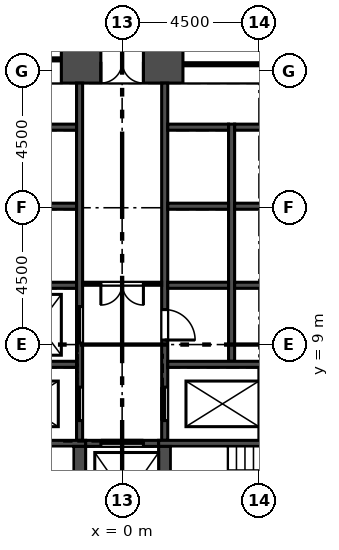
"""IFC4 building model, lengths in metres.
Left out: names, types, materials, properties, quantities, classifications, styles, units other than length and angle.
Written with IfcOpenShell. Run it as: python <this file> out.ifc"""

import sys

from ifc_helpers import new_model, si_unit, direction, frame, frame_2d, origin, place, context, subcontext, project, spatial, rectangle, extrude, element, fill, save


model = new_model("IFC4")
c1 = context("Model", 3, precision=1e-05, world=origin(), true_north=direction((0.0, 1.0)))
c2 = subcontext(c1, "Body", "Model", "MODEL_VIEW")
j1 = project(units=[si_unit("LENGTHUNIT", "METRE"), si_unit("PLANEANGLEUNIT", "RADIAN")], contexts=[c1])
p1 = place(None, origin())
s1 = spatial("IfcSite", under=j1, at=p1, CompositionType="ELEMENT")
p2 = place(p1, origin())
s2 = spatial("IfcBuilding", under=s1, at=p2, CompositionType="ELEMENT")
p3 = place(p2, frame((0.0, 0.0, 20.0)))
s3 = spatial("IfcBuildingStorey", under=s2, at=p3, CompositionType="ELEMENT", Elevation=20.0)
p4 = place(p3, frame((9.412, 18.3, 0.0), z_axis=(0.0, 0.0, 1.0), x_axis=(-1.0, 0.0, 0.0)))
e1 = element("IfcWall", 1, at=p4, inside=s3, PredefinedType="SHEAR", context=c2, shape_type="SweptSolid", body=[
    extrude(rectangle(XDim=18.823, YDim=1.4, at=frame_2d((9.412, 0.0))), origin(), (0.0, 0.0, 1.0), 5.0),
])
p5 = place(p4, frame((8.711, 0.0, 0.0)))
e2 = element("IfcOpeningElement", 2, at=p5, cuts=e1, PredefinedType="OPENING", context=c2, shape_type="SweptSolid", body=[
    extrude(rectangle(XDim=1.4, YDim=2.1, at=frame_2d((0.7, 1.05))), frame((0.0, 0.71, 0.0), z_axis=(0.0, -1.0, 0.0), x_axis=(1.0, 0.0, 0.0)), (0.0, 0.0, 1.0), 1.42),
])
p6 = place(p4, frame((11.412, 0.0, 0.0)))
e3 = element("IfcOpeningElement", 3, at=p6, cuts=e1, PredefinedType="OPENING", context=c2, shape_type="SweptSolid", body=[
    extrude(rectangle(XDim=6.0, YDim=2.4, at=frame_2d((3.0, 1.2))), frame((0.0, 0.71, 0.0), z_axis=(0.0, -1.0, 0.0), x_axis=(1.0, 0.0, 0.0)), (0.0, 0.0, 1.0), 1.42),
])
p7 = place(p4, frame((1.412, 0.0, 0.0)))
e4 = element("IfcOpeningElement", 4, at=p7, cuts=e1, PredefinedType="OPENING", context=c2, shape_type="SweptSolid", body=[
    extrude(rectangle(XDim=6.0, YDim=2.4, at=frame_2d((3.0, 1.2))), frame((0.0, 0.71, 0.0), z_axis=(0.0, -1.0, 0.0), x_axis=(1.0, 0.0, 0.0)), (0.0, 0.0, 1.0), 1.42),
])
p8 = place(p3, frame((3.6, 8.45, -0.3), z_axis=(0.0, 0.0, 1.0), x_axis=(0.0, 1.0, 0.0)))
e5 = element("IfcWall", 5, at=p8, inside=s3, PredefinedType="SOLIDWALL", context=c2, shape_type="SweptSolid", body=[
    extrude(rectangle(XDim=7.8, YDim=0.2, at=frame_2d((3.9, 0.0))), origin(), (0.0, 0.0, 1.0), 3.3),
])
p9 = place(p3, frame((-1.4, 5.85, -0.3), z_axis=(0.0, 0.0, 1.0), x_axis=(0.0, 1.0, 0.0)))
e6 = element("IfcWall", 6, at=p9, inside=s3, PredefinedType="SOLIDWALL", context=c2, shape_type="SweptSolid", body=[
    extrude(rectangle(XDim=11.75, YDim=0.2, at=frame_2d((5.875, 0.0))), origin(), (0.0, 0.0, 1.0), 3.3),
])
p10 = place(p9, frame((3.2, 0.0, 0.3)))
e7 = element("IfcOpeningElement", 7, at=p10, cuts=e6, PredefinedType="OPENING", context=c2, shape_type="SweptSolid", body=[
    extrude(rectangle(XDim=1.2, YDim=2.1, at=frame_2d((0.6, 1.05))), frame((0.0, 0.11, 0.0), z_axis=(0.0, -1.0, 0.0), x_axis=(1.0, 0.0, 0.0)), (0.0, 0.0, 1.0), 0.22),
])
p11 = place(p9, frame((0.65, 0.0, 0.3)))
e8 = element("IfcOpeningElement", 8, at=p11, cuts=e6, PredefinedType="OPENING", context=c2, shape_type="SweptSolid", body=[
    extrude(rectangle(XDim=1.1, YDim=2.1, at=frame_2d((0.55, 1.05))), frame((0.0, 0.11, 0.0), z_axis=(0.0, -1.0, 0.0), x_axis=(1.0, 0.0, 0.0)), (0.0, 0.0, 1.0), 0.22),
])
p12 = place(p3, frame((1.4, 5.85, -0.3), z_axis=(0.0, 0.0, 1.0), x_axis=(0.0, 1.0, 0.0)))
e9 = element("IfcWall", 9, at=p12, inside=s3, PredefinedType="SOLIDWALL", context=c2, shape_type="SweptSolid", body=[
    extrude(rectangle(XDim=11.75, YDim=0.2, at=frame_2d((5.875, 0.0))), origin(), (0.0, 0.0, 1.0), 3.3),
])
p13 = place(p12, frame((0.65, 0.0, 0.3)))
e10 = element("IfcOpeningElement", 10, at=p13, cuts=e9, PredefinedType="OPENING", context=c2, shape_type="SweptSolid", body=[
    extrude(rectangle(XDim=1.1, YDim=2.1, at=frame_2d((0.55, 1.05))), frame((0.0, 0.11, 0.0), z_axis=(0.0, -1.0, 0.0), x_axis=(1.0, 0.0, 0.0)), (0.0, 0.0, 1.0), 0.22),
])
p14 = place(p12, frame((3.3, 0.0, 0.3)))
e11 = element("IfcOpeningElement", 11, at=p14, cuts=e9, PredefinedType="OPENING", context=c2, shape_type="SweptSolid", body=[
    extrude(rectangle(XDim=1.0, YDim=2.1, at=frame_2d((0.5, 1.05))), frame((0.0, 0.11, 0.0), z_axis=(0.0, -1.0, 0.0), x_axis=(1.0, 0.0, 0.0)), (0.0, 0.0, 1.0), 0.22),
])
for number, where, z_axis, x_axis in (
    (12, (-5.7, 8.35, -0.3), (0.0, 0.0, 1.0), (1.0, 0.0, 0.0)),
    (13, (1.5, 8.35, -0.3), (0.0, 0.0, 1.0), (1.0, 0.0, 0.0)),
):
    element("IfcWall", number, at=place(p3, frame(where, z_axis=z_axis, x_axis=x_axis)), inside=s3, PredefinedType="SOLIDWALL", context=c2, shape_type="SweptSolid", body=[
        extrude(rectangle(XDim=4.2, YDim=0.2, at=frame_2d((2.1, 0.0))), origin(), (0.0, 0.0, 1.0), 3.3),
    ])
p15 = place(p3, frame((-12.6, 5.75, -0.3), z_axis=(0.0, 0.0, 1.0), x_axis=(1.0, 0.0, 0.0)))
e14 = element("IfcWall", 14, at=p15, inside=s3, PredefinedType="SOLIDWALL", context=c2, shape_type="SweptSolid", body=[
    extrude(rectangle(XDim=11.4, YDim=0.2, at=frame_2d((5.7, 0.0))), origin(), (0.0, 0.0, 1.0), 3.3),
])
p16 = place(p3, frame((-1.2, 5.75, -0.3), z_axis=(0.0, 0.0, 1.0), x_axis=(1.0, 0.0, 0.0)))
e15 = element("IfcWall", 15, at=p16, inside=s3, PredefinedType="SOLIDWALL", context=c2, shape_type="SweptSolid", body=[
    extrude(rectangle(XDim=2.4, YDim=0.2, at=frame_2d((1.2, 0.0))), origin(), (0.0, 0.0, 1.0), 3.3),
])
p17 = place(p16, frame((0.5, 0.0, 0.3)))
e16 = element("IfcOpeningElement", 16, at=p17, cuts=e15, PredefinedType="OPENING", context=c2, shape_type="SweptSolid", body=[
    extrude(rectangle(XDim=1.4, YDim=2.1, at=frame_2d((0.7, 1.05))), frame((0.0, 0.11, 0.0), z_axis=(0.0, -1.0, 0.0), x_axis=(1.0, 0.0, 0.0)), (0.0, 0.0, 1.0), 0.22),
])
p18 = place(p3, frame((1.2, 5.75, -0.3), z_axis=(0.0, 0.0, 1.0), x_axis=(1.0, 0.0, 0.0)))
e17 = element("IfcWall", 17, at=p18, inside=s3, PredefinedType="SOLIDWALL", context=c2, shape_type="SweptSolid", body=[
    extrude(rectangle(XDim=11.4, YDim=0.2, at=frame_2d((5.7, 0.0))), origin(), (0.0, 0.0, 1.0), 3.3),
])
for number, where, z_axis, x_axis in (
    (18, (-1.4, 2.25, -0.3), (0.0, 0.0, 1.0), (0.0, 1.0, 0.0)),
    (19, (1.4, 2.25, -0.3), (0.0, 0.0, 1.0), (0.0, 1.0, 0.0)),
):
    element("IfcWall", number, at=place(p3, frame(where, z_axis=z_axis, x_axis=x_axis)), inside=s3, PredefinedType="SOLIDWALL", context=c2, shape_type="SweptSolid", body=[
        extrude(rectangle(XDim=3.4, YDim=0.4, at=frame_2d((1.7, 0.0))), origin(), (0.0, 0.0, 1.0), 3.3),
    ])
for number, where, z_axis, x_axis in (
    (20, (-3.5, 10.95, -0.3), (0.0, 0.0, 1.0), (1.0, 0.0, 0.0)),
    (21, (-3.5, 13.55, -0.3), (0.0, 0.0, 1.0), (1.0, 0.0, 0.0)),
    (22, (-3.5, 16.15, -0.3), (0.0, 0.0, 1.0), (1.0, 0.0, 0.0)),
    (23, (3.7, 10.95, -0.3), (0.0, 0.0, 1.0), (1.0, 0.0, 0.0)),
    (24, (3.7, 13.55, -0.3), (0.0, 0.0, 1.0), (1.0, 0.0, 0.0)),
    (25, (3.7, 16.15, -0.3), (0.0, 0.0, 1.0), (1.0, 0.0, 0.0)),
    (26, (1.5, 10.95, -0.3), (0.0, 0.0, 1.0), (1.0, 0.0, 0.0)),
    (27, (1.5, 13.55, -0.3), (0.0, 0.0, 1.0), (1.0, 0.0, 0.0)),
    (28, (1.5, 16.15, -0.3), (0.0, 0.0, 1.0), (1.0, 0.0, 0.0)),
):
    element("IfcWall", number, at=place(p3, frame(where, z_axis=z_axis, x_axis=x_axis)), inside=s3, PredefinedType="SOLIDWALL", context=c2, shape_type="SweptSolid", body=[
        extrude(rectangle(XDim=2.0, YDim=0.2, at=frame_2d((1.0, 0.0))), origin(), (0.0, 0.0, 1.0), 3.3),
    ])
p19 = place(p3, frame((-1.3, 11.0, 0.0), z_axis=(0.0, 0.0, 1.0), x_axis=(1.0, 0.0, 0.0)))
e29 = element("IfcWall", 29, at=p19, inside=s3, PredefinedType="PARTITIONING", context=c2, shape_type="SweptSolid", body=[
    extrude(rectangle(XDim=2.6, YDim=0.1, at=frame_2d((1.3, 0.0))), origin(), (0.0, 0.0, 1.0), 3.0),
])
p20 = place(p19, frame((0.6, 0.0, 0.0)))
e30 = element("IfcOpeningElement", 30, at=p20, cuts=e29, PredefinedType="OPENING", context=c2, shape_type="SweptSolid", body=[
    extrude(rectangle(XDim=1.4, YDim=2.1, at=frame_2d((0.7, 1.05))), frame((0.0, 0.06, 0.0), z_axis=(0.0, -1.0, 0.0), x_axis=(1.0, 0.0, 0.0)), (0.0, 0.0, 1.0), 0.12),
])
p21 = place(p10, origin())
e31 = element("IfcDoor", 31, at=p21, inside=s3, OperationType="SLIDING_TO_LEFT", PredefinedType="DOOR", context=c2, shape_type="SweptSolid", body=[
    extrude(rectangle(XDim=1.2, YDim=2.1, at=frame_2d((0.6, 1.05))), frame((0.0, 0.025, 0.0), z_axis=(0.0, -1.0, 0.0), x_axis=(1.0, 0.0, 0.0)), (0.0, 0.0, 1.0), 0.05),
])
fill(e7, e31)
p22 = place(p11, origin())
e32 = element("IfcDoor", 32, at=p22, inside=s3, OperationType="SLIDING_TO_RIGHT", PredefinedType="DOOR", context=c2, shape_type="SweptSolid", body=[
    extrude(rectangle(XDim=1.1, YDim=2.1, at=frame_2d((0.55, 1.05))), frame((0.0, 0.025, 0.0), z_axis=(0.0, -1.0, 0.0), x_axis=(1.0, 0.0, 0.0)), (0.0, 0.0, 1.0), 0.05),
])
fill(e8, e32)
p23 = place(p13, origin())
e33 = element("IfcDoor", 33, at=p23, inside=s3, OperationType="SLIDING_TO_RIGHT", PredefinedType="DOOR", context=c2, shape_type="SweptSolid", body=[
    extrude(rectangle(XDim=1.1, YDim=2.1, at=frame_2d((0.55, 1.05))), frame((0.0, 0.025, 0.0), z_axis=(0.0, -1.0, 0.0), x_axis=(1.0, 0.0, 0.0)), (0.0, 0.0, 1.0), 0.05),
])
fill(e10, e33)
p24 = place(p17, origin())
e34 = element("IfcDoor", 34, at=p24, inside=s3, OperationType="SLIDING_TO_LEFT", PredefinedType="DOOR", context=c2, shape_type="SweptSolid", body=[
    extrude(rectangle(XDim=1.4, YDim=2.1, at=frame_2d((0.7, 1.05))), frame((0.0, 0.025, 0.0), z_axis=(0.0, -1.0, 0.0), x_axis=(1.0, 0.0, 0.0)), (0.0, 0.0, 1.0), 0.05),
])
fill(e16, e34)
p25 = place(p14, frame((1.0, 0.0, 0.0), z_axis=(0.0, 0.0, 1.0), x_axis=(-1.0, 0.0, 0.0)))
e35 = element("IfcDoor", 35, at=p25, inside=s3, OperationType="SINGLE_SWING_RIGHT", PredefinedType="DOOR", context=c2, shape_type="SweptSolid", body=[
    extrude(rectangle(XDim=1.0, YDim=2.1, at=frame_2d((0.5, 1.05))), frame((0.0, 0.025, 0.0), z_axis=(0.0, -1.0, 0.0), x_axis=(1.0, 0.0, 0.0)), (0.0, 0.0, 1.0), 0.05),
])
fill(e11, e35)
p26 = place(p20, frame((1.4, 0.0, 0.0), z_axis=(0.0, 0.0, 1.0), x_axis=(-1.0, 0.0, 0.0)))
e36 = element("IfcDoor", 36, at=p26, inside=s3, OperationType="DOUBLE_DOOR_SINGLE_SWING", PredefinedType="DOOR", context=c2, shape_type="SweptSolid", body=[
    extrude(rectangle(XDim=1.4, YDim=2.1, at=frame_2d((0.7, 1.05))), frame((0.0, 0.025, 0.0), z_axis=(0.0, -1.0, 0.0), x_axis=(1.0, 0.0, 0.0)), (0.0, 0.0, 1.0), 0.05),
])
fill(e30, e36)
p27 = place(p5, origin())
e37 = element("IfcDoor", 37, at=p27, inside=s3, OperationType="DOUBLE_DOOR_SINGLE_SWING", PredefinedType="DOOR", context=c2, shape_type="SweptSolid", body=[
    extrude(rectangle(XDim=1.4, YDim=2.1, at=frame_2d((0.7, 1.05))), frame((0.0, 0.025, 0.0), z_axis=(0.0, -1.0, 0.0), x_axis=(1.0, 0.0, 0.0)), (0.0, 0.0, 1.0), 0.05),
])
fill(e2, e37)
p28 = place(p6, origin())
e38 = element("IfcDoor", 38, at=p28, inside=s3, OperationType="DOUBLE_DOOR_SLIDING", PredefinedType="DOOR", context=c2, shape_type="SweptSolid", body=[
    extrude(rectangle(XDim=6.0, YDim=2.4, at=frame_2d((3.0, 1.2))), frame((0.0, 0.025, 0.0), z_axis=(0.0, -1.0, 0.0), x_axis=(1.0, 0.0, 0.0)), (0.0, 0.0, 1.0), 0.05),
])
fill(e3, e38)
p29 = place(p7, origin())
e39 = element("IfcDoor", 39, at=p29, inside=s3, OperationType="DOUBLE_DOOR_SLIDING", PredefinedType="DOOR", context=c2, shape_type="SweptSolid", body=[
    extrude(rectangle(XDim=6.0, YDim=2.4, at=frame_2d((3.0, 1.2))), frame((0.0, 0.025, 0.0), z_axis=(0.0, -1.0, 0.0), x_axis=(1.0, 0.0, 0.0)), (0.0, 0.0, 1.0), 0.05),
])
fill(e4, e39)
save(model, sys.argv[1])
